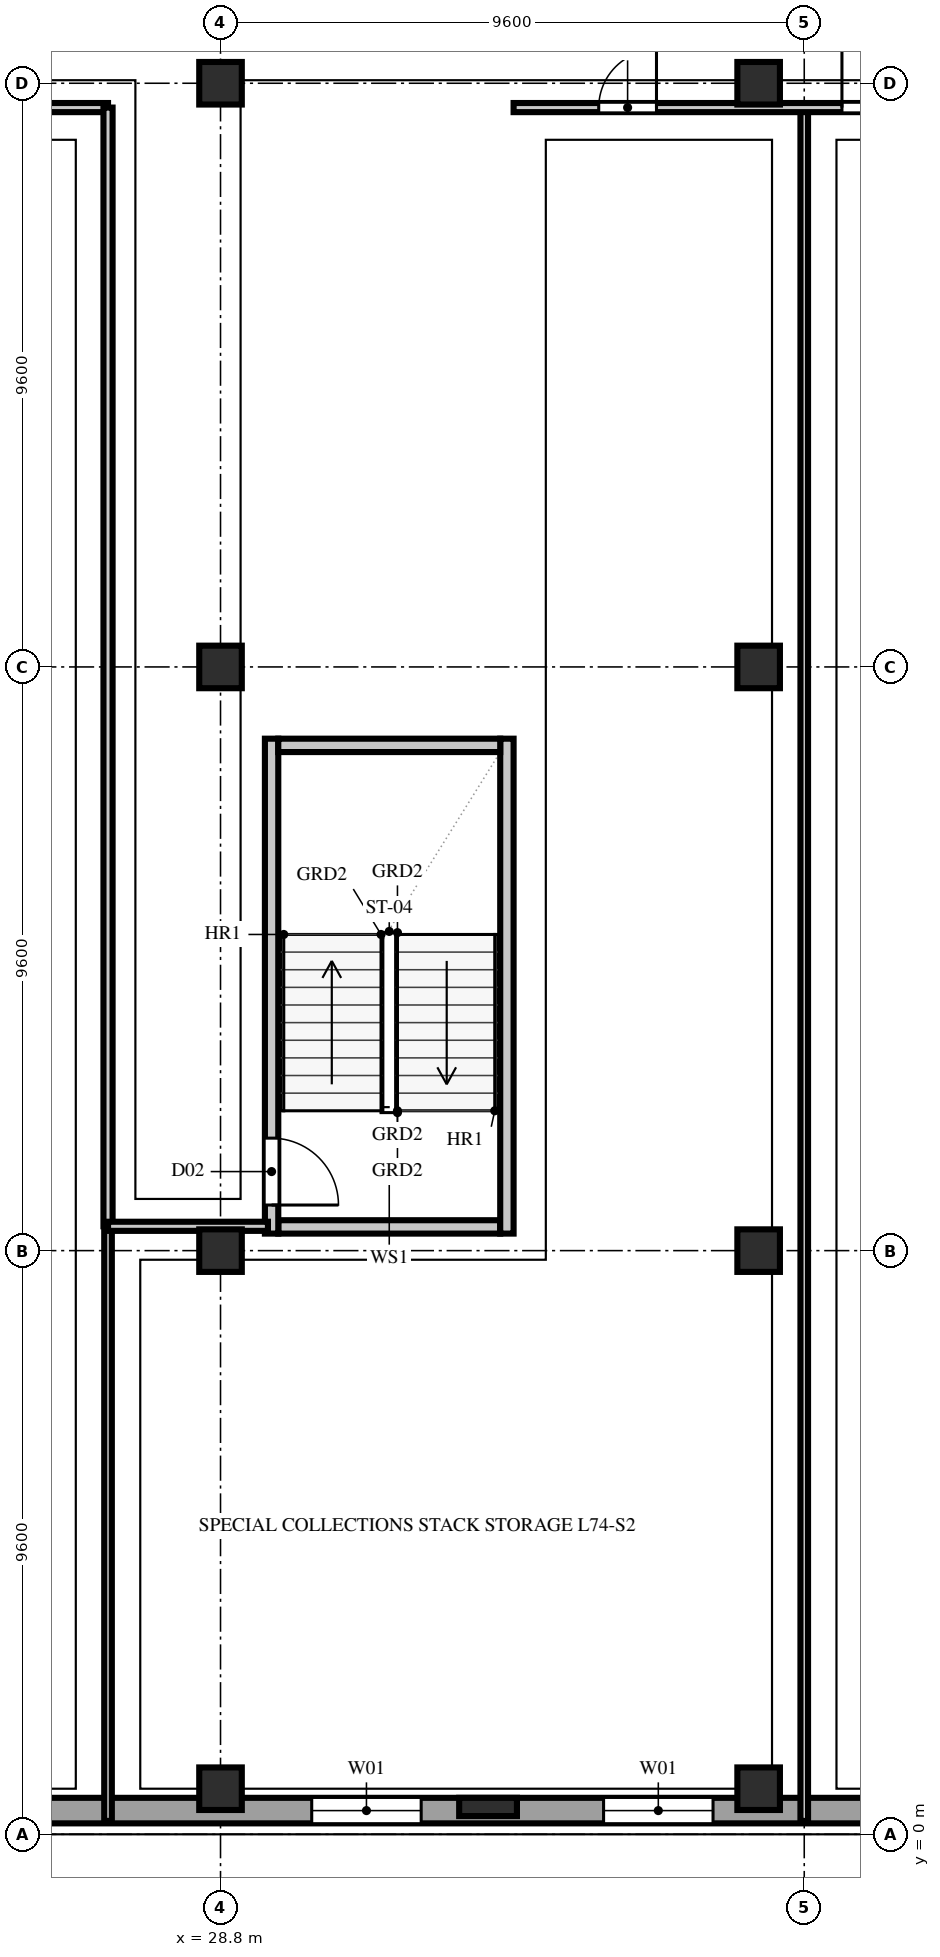
"""IFC4 building model, lengths in metres.
Left out: names, types, materials, properties, quantities, classifications, styles, units other than length and angle.
Written with IfcOpenShell. Run it as: python <this file> out.ifc"""

import sys

from ifc_helpers import new_model, si_unit, direction, frame, frame_2d, origin, origin_2d, place, context, subcontext, project, spatial, rectangle, extrude, element, fill, save


model = new_model("IFC4")
c1 = context("Model", 3, precision=1e-05, world=origin(), true_north=direction((0.0, 1.0)))
c2 = subcontext(c1, "Body", "Model", "MODEL_VIEW")
j1 = project(units=[si_unit("LENGTHUNIT", "METRE"), si_unit("PLANEANGLEUNIT", "RADIAN")], contexts=[c1])
p1 = place(None, origin())
s1 = spatial("IfcSite", under=j1, at=p1, CompositionType="ELEMENT")
p2 = place(p1, origin())
s2 = spatial("IfcBuilding", under=s1, at=p2, CompositionType="ELEMENT")
p3 = place(p2, frame((0.0, 0.0, 292.4)))
s3 = spatial("IfcBuildingStorey", under=s2, at=p3, CompositionType="ELEMENT", Elevation=292.4)
for number, where, z_axis, x_axis in (
    (1, (28.8, 0.75, 0.0), (0.0, 0.0, 1.0), (1.0, 0.0, 0.0)),
    (2, (28.8, 9.6, 0.0), (0.0, 0.0, 1.0), (1.0, 0.0, 0.0)),
    (3, (28.8, 19.2, 0.0), (0.0, 0.0, 1.0), (1.0, 0.0, 0.0)),
    (4, (28.8, 28.8, 0.0), (0.0, 0.0, 1.0), (1.0, 0.0, 0.0)),
    (5, (37.65, 0.75, 0.0), (0.0, 0.0, 1.0), (1.0, 0.0, 0.0)),
    (6, (37.65, 9.6, 0.0), (0.0, 0.0, 1.0), (1.0, 0.0, 0.0)),
    (7, (37.65, 19.2, 0.0), (0.0, 0.0, 1.0), (1.0, 0.0, 0.0)),
    (8, (37.65, 28.8, 0.0), (0.0, 0.0, 1.0), (1.0, 0.0, 0.0)),
):
    element("IfcColumn", number, at=place(p3, frame(where, z_axis=z_axis, x_axis=x_axis)), inside=s3, PredefinedType="COLUMN", context=c2, shape_type="SweptSolid", body=[
        extrude(rectangle(XDim=0.7, YDim=0.7, at=origin_2d()), origin(), (0.0, 0.0, 1.0), 3.8),
    ])
p4 = place(p3, frame((33.2, 0.45, 0.0), z_axis=(0.0, 0.0, 1.0), x_axis=(1.0, 0.0, 0.0)))
e9 = element("IfcColumn", 9, at=p4, inside=s3, PredefinedType="PILASTER", context=c2, shape_type="SweptSolid", body=[
    extrude(rectangle(XDim=0.95, YDim=0.3, at=origin_2d()), origin(), (0.0, 0.0, 1.0), 3.8),
])
p5 = place(p3, frame((1.84, 0.39, 0.0), z_axis=(0.0, 0.0, 1.0), x_axis=(1.0, 0.0, 0.0)))
e10 = element("IfcWall", 10, at=p5, inside=s3, PredefinedType="SOLIDWALL", context=c2, shape_type="SweptSolid", body=[
    extrude(rectangle(XDim=44.32, YDim=0.42, at=frame_2d((22.16, 0.0))), origin(), (0.0, 0.0, 1.0), 3.54),
])
p6 = place(p5, frame((4.46, 0.0, 0.85)))
e11 = element("IfcOpeningElement", 11, at=p6, cuts=e10, PredefinedType="OPENING", context=c2, shape_type="SweptSolid", body=[
    extrude(rectangle(XDim=1.8, YDim=1.85, at=frame_2d((0.9, 0.925))), frame((0.0, 0.222, 0.0), z_axis=(0.0, -1.0, 0.0), x_axis=(1.0, 0.0, 0.0)), (0.0, 0.0, 1.0), 0.444),
])
p7 = place(p5, frame((9.26, 0.0, 0.85)))
e12 = element("IfcOpeningElement", 12, at=p7, cuts=e10, PredefinedType="OPENING", context=c2, shape_type="SweptSolid", body=[
    extrude(rectangle(XDim=1.8, YDim=1.85, at=frame_2d((0.9, 0.925))), frame((0.0, 0.222, 0.0), z_axis=(0.0, -1.0, 0.0), x_axis=(1.0, 0.0, 0.0)), (0.0, 0.0, 1.0), 0.444),
])
p8 = place(p5, frame((18.86, 0.0, 0.85)))
e13 = element("IfcOpeningElement", 13, at=p8, cuts=e10, PredefinedType="OPENING", context=c2, shape_type="SweptSolid", body=[
    extrude(rectangle(XDim=1.8, YDim=1.85, at=frame_2d((0.9, 0.925))), frame((0.0, 0.222, 0.0), z_axis=(0.0, -1.0, 0.0), x_axis=(1.0, 0.0, 0.0)), (0.0, 0.0, 1.0), 0.444),
])
p9 = place(p5, frame((28.46, 0.0, 0.85)))
e14 = element("IfcOpeningElement", 14, at=p9, cuts=e10, PredefinedType="OPENING", context=c2, shape_type="SweptSolid", body=[
    extrude(rectangle(XDim=1.8, YDim=1.85, at=frame_2d((0.9, 0.925))), frame((0.0, 0.222, 0.0), z_axis=(0.0, -1.0, 0.0), x_axis=(1.0, 0.0, 0.0)), (0.0, 0.0, 1.0), 0.444),
])
p10 = place(p5, frame((33.26, 0.0, 0.85)))
e15 = element("IfcOpeningElement", 15, at=p10, cuts=e10, PredefinedType="OPENING", context=c2, shape_type="SweptSolid", body=[
    extrude(rectangle(XDim=1.8, YDim=1.85, at=frame_2d((0.9, 0.925))), frame((0.0, 0.222, 0.0), z_axis=(0.0, -1.0, 0.0), x_axis=(1.0, 0.0, 0.0)), (0.0, 0.0, 1.0), 0.444),
])
p11 = place(p5, frame((38.06, 0.0, 0.85)))
e16 = element("IfcOpeningElement", 16, at=p11, cuts=e10, PredefinedType="OPENING", context=c2, shape_type="SweptSolid", body=[
    extrude(rectangle(XDim=1.8, YDim=1.85, at=frame_2d((0.9, 0.925))), frame((0.0, 0.222, 0.0), z_axis=(0.0, -1.0, 0.0), x_axis=(1.0, 0.0, 0.0)), (0.0, 0.0, 1.0), 0.444),
])
p12 = place(p3, frame((29.75, 9.99, 0.0), z_axis=(0.0, 0.0, 1.0), x_axis=(1.0, 0.0, 0.0)))
e17 = element("IfcWall", 17, at=p12, inside=s3, PredefinedType="SOLIDWALL", context=c2, shape_type="SweptSolid", body=[
    extrude(rectangle(XDim=3.65, YDim=0.22, at=frame_2d((1.825, 0.0))), origin(), (0.0, 0.0, 1.0), 3.54),
])
p13 = place(p3, frame((29.64, 9.88, 0.0), z_axis=(0.0, 0.0, 1.0), x_axis=(0.0, 1.0, 0.0)))
e18 = element("IfcWall", 18, at=p13, inside=s3, PredefinedType="SOLIDWALL", context=c2, shape_type="SweptSolid", body=[
    extrude(rectangle(XDim=8.14, YDim=0.22, at=frame_2d((4.07, 0.0))), origin(), (0.0, 0.0, 1.0), 3.54),
])
p14 = place(p13, frame((0.47, 0.0, 0.0)))
e19 = element("IfcOpeningElement", 19, at=p14, cuts=e18, PredefinedType="OPENING", context=c2, shape_type="SweptSolid", body=[
    extrude(rectangle(XDim=1.1, YDim=2.2, at=frame_2d((0.55, 1.1))), frame((0.0, 0.122, 0.0), z_axis=(0.0, -1.0, 0.0), x_axis=(1.0, 0.0, 0.0)), (0.0, 0.0, 1.0), 0.244),
])
p15 = place(p3, frame((33.51, 9.88, 0.0), z_axis=(0.0, 0.0, 1.0), x_axis=(0.0, 1.0, 0.0)))
e20 = element("IfcWall", 20, at=p15, inside=s3, PredefinedType="SOLIDWALL", context=c2, shape_type="SweptSolid", body=[
    extrude(rectangle(XDim=8.14, YDim=0.22, at=frame_2d((4.07, 0.0))), origin(), (0.0, 0.0, 1.0), 3.54),
])
p16 = place(p3, frame((29.75, 17.91, 0.0), z_axis=(0.0, 0.0, 1.0), x_axis=(1.0, 0.0, 0.0)))
e21 = element("IfcWall", 21, at=p16, inside=s3, PredefinedType="SOLIDWALL", context=c2, shape_type="SweptSolid", body=[
    extrude(rectangle(XDim=3.65, YDim=0.22, at=frame_2d((1.825, 0.0))), origin(), (0.0, 0.0, 1.0), 3.54),
])
p17 = place(p3, frame((19.2, 28.4, 0.0), z_axis=(0.0, 0.0, 1.0), x_axis=(1.0, 0.0, 0.0)))
e22 = element("IfcWall", 22, at=p17, inside=s3, PredefinedType="PARTITIONING", context=c2, shape_type="SweptSolid", body=[
    extrude(rectangle(XDim=7.75, YDim=0.15, at=frame_2d((3.875, 0.0))), origin(), (0.0, 0.0, 1.0), 3.54),
])
p18 = place(p17, frame((2.8, 0.0, 0.0)))
e23 = element("IfcOpeningElement", 23, at=p18, cuts=e22, PredefinedType="OPENING", context=c2, shape_type="SweptSolid", body=[
    extrude(rectangle(XDim=0.95, YDim=2.15, at=frame_2d((0.475, 1.075))), frame((0.0, 0.087, 0.0), z_axis=(0.0, -1.0, 0.0), x_axis=(1.0, 0.0, 0.0)), (0.0, 0.0, 1.0), 0.174),
])
p19 = place(p3, frame((26.95, 0.22, 0.0), z_axis=(0.0, 0.0, 1.0), x_axis=(0.0, 1.0, 0.0)))
e24 = element("IfcWall", 24, at=p19, inside=s3, PredefinedType="PARTITIONING", context=c2, shape_type="SweptSolid", body=[
    extrude(rectangle(XDim=9.78, YDim=0.125, at=frame_2d((4.89, 0.0))), origin(), (0.0, 0.0, 1.0), 3.54),
])
p20 = place(p3, frame((26.95, 10.0, 0.0), z_axis=(0.0, 0.0, 1.0), x_axis=(0.0, 1.0, 0.0)))
e25 = element("IfcWall", 25, at=p20, inside=s3, PredefinedType="PARTITIONING", context=c2, shape_type="SweptSolid", body=[
    extrude(rectangle(XDim=18.4, YDim=0.15, at=frame_2d((9.2, 0.0))), origin(), (0.0, 0.0, 1.0), 3.54),
])
p21 = place(p3, frame((26.95, 10.0, 0.0), z_axis=(0.0, 0.0, 1.0), x_axis=(1.0, 0.0, 0.0)))
e26 = element("IfcWall", 26, at=p21, inside=s3, PredefinedType="PARTITIONING", context=c2, shape_type="SweptSolid", body=[
    extrude(rectangle(XDim=2.63, YDim=0.15, at=frame_2d((1.315, 0.0))), origin(), (0.0, 0.0, 1.0), 3.54),
])
p22 = place(p3, frame((38.4, 0.22, 0.0), z_axis=(0.0, 0.0, 1.0), x_axis=(0.0, 1.0, 0.0)))
e27 = element("IfcWall", 27, at=p22, inside=s3, PredefinedType="PARTITIONING", context=c2, shape_type="SweptSolid", body=[
    extrude(rectangle(XDim=28.18, YDim=0.125, at=frame_2d((14.09, 0.0))), origin(), (0.0, 0.0, 1.0), 3.54),
])
p23 = place(p3, frame((33.62, 28.4, 0.0), z_axis=(0.0, 0.0, 1.0), x_axis=(1.0, 0.0, 0.0)))
e28 = element("IfcWall", 28, at=p23, inside=s3, PredefinedType="PARTITIONING", context=c2, shape_type="SweptSolid", body=[
    extrude(rectangle(XDim=14.16, YDim=0.15, at=frame_2d((7.08, 0.0))), origin(), (0.0, 0.0, 1.0), 3.54),
])
p24 = place(p23, frame((1.4, 0.0, 0.0)))
e29 = element("IfcOpeningElement", 29, at=p24, cuts=e28, PredefinedType="OPENING", context=c2, shape_type="SweptSolid", body=[
    extrude(rectangle(XDim=0.95, YDim=2.15, at=frame_2d((0.475, 1.075))), frame((0.0, 0.087, 0.0), z_axis=(0.0, -1.0, 0.0), x_axis=(1.0, 0.0, 0.0)), (0.0, 0.0, 1.0), 0.174),
])
p25 = place(p23, frame((5.4, 0.0, 0.0)))
e30 = element("IfcOpeningElement", 30, at=p25, cuts=e28, PredefinedType="OPENING", context=c2, shape_type="SweptSolid", body=[
    extrude(rectangle(XDim=0.95, YDim=2.15, at=frame_2d((0.475, 1.075))), frame((0.0, 0.087, 0.0), z_axis=(0.0, -1.0, 0.0), x_axis=(1.0, 0.0, 0.0)), (0.0, 0.0, 1.0), 0.174),
])
p26 = place(p9, origin())
e31 = element("IfcWindow", 31, at=p26, inside=s3, PartitioningType="DOUBLE_PANEL_VERTICAL", PredefinedType="WINDOW", context=c2, shape_type="SweptSolid", body=[
    extrude(rectangle(XDim=1.8, YDim=1.85, at=frame_2d((0.9, 0.925))), frame((0.0, 0.11, 0.0), z_axis=(0.0, -1.0, 0.0), x_axis=(1.0, 0.0, 0.0)), (0.0, 0.0, 1.0), 0.06),
])
fill(e14, e31)
p27 = place(p10, origin())
e32 = element("IfcWindow", 32, at=p27, inside=s3, PartitioningType="DOUBLE_PANEL_VERTICAL", PredefinedType="WINDOW", context=c2, shape_type="SweptSolid", body=[
    extrude(rectangle(XDim=1.8, YDim=1.85, at=frame_2d((0.9, 0.925))), frame((0.0, 0.11, 0.0), z_axis=(0.0, -1.0, 0.0), x_axis=(1.0, 0.0, 0.0)), (0.0, 0.0, 1.0), 0.06),
])
fill(e15, e32)
p28 = place(p14, frame((1.1, 0.0, 0.0), z_axis=(0.0, 0.0, 1.0), x_axis=(-1.0, 0.0, 0.0)))
e33 = element("IfcDoor", 33, at=p28, inside=s3, OperationType="SINGLE_SWING_RIGHT", PredefinedType="DOOR", context=c2, shape_type="SweptSolid", body=[
    extrude(rectangle(XDim=1.1, YDim=2.2, at=frame_2d((0.55, 1.1))), frame((0.0, 0.025, 0.0), z_axis=(0.0, -1.0, 0.0), x_axis=(1.0, 0.0, 0.0)), (0.0, 0.0, 1.0), 0.05),
])
fill(e19, e33)
p29 = place(p24, origin())
e34 = element("IfcDoor", 34, at=p29, inside=s3, OperationType="SINGLE_SWING_RIGHT", PredefinedType="DOOR", context=c2, shape_type="SweptSolid", body=[
    extrude(rectangle(XDim=0.95, YDim=2.15, at=frame_2d((0.475, 1.075))), frame((0.0, 0.025, 0.0), z_axis=(0.0, -1.0, 0.0), x_axis=(1.0, 0.0, 0.0)), (0.0, 0.0, 1.0), 0.05),
])
fill(e29, e34)
p30 = place(p25, origin())
e35 = element("IfcDoor", 35, at=p30, inside=s3, OperationType="SINGLE_SWING_LEFT", PredefinedType="DOOR", context=c2, shape_type="SweptSolid", body=[
    extrude(rectangle(XDim=0.95, YDim=2.15, at=frame_2d((0.475, 1.075))), frame((0.0, 0.025, 0.0), z_axis=(0.0, -1.0, 0.0), x_axis=(1.0, 0.0, 0.0)), (0.0, 0.0, 1.0), 0.05),
])
fill(e30, e35)
save(model, sys.argv[1])
